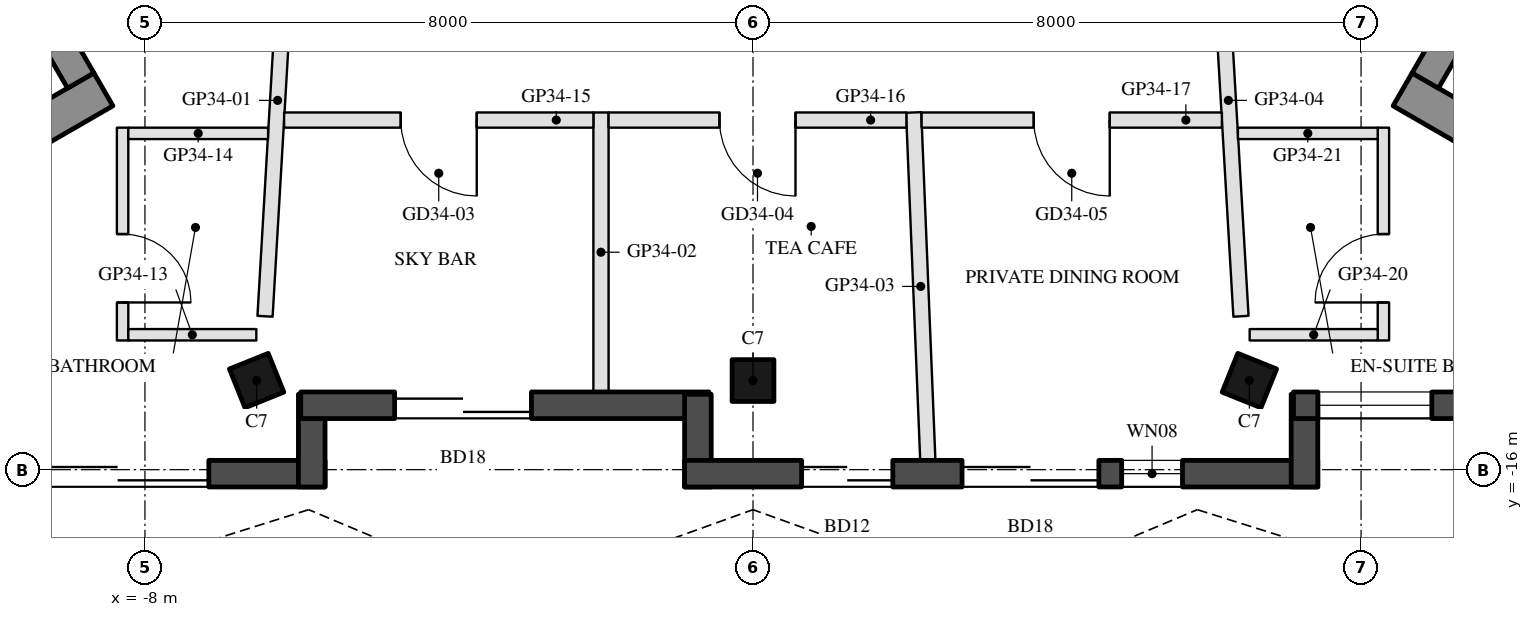
"""IFC4 building model, lengths in metres.
Left out: names, types, materials, properties, quantities, classifications, styles, units other than length and angle.
Written with IfcOpenShell. Run it as: python <this file> out.ifc"""

import sys

from ifc_helpers import new_model, si_unit, direction, frame, frame_2d, origin, origin_2d, place, context, subcontext, project, spatial, rectangle, hollow_rectangle, extrude, boolean, halfspace, element, fill, save


model = new_model("IFC4")
c1 = context("Model", 3, precision=1e-05, world=origin(), true_north=direction((0.0, 1.0)))
c2 = subcontext(c1, "Body", "Model", "MODEL_VIEW")
j1 = project(units=[si_unit("LENGTHUNIT", "METRE"), si_unit("PLANEANGLEUNIT", "RADIAN")], contexts=[c1])
p1 = place(None, origin())
s1 = spatial("IfcSite", under=j1, at=p1, CompositionType="ELEMENT")
p2 = place(p1, origin())
s2 = spatial("IfcBuilding", under=s1, at=p2, CompositionType="ELEMENT")
p3 = place(p2, frame((0.0, 0.0, 320.7)))
s3 = spatial("IfcBuildingStorey", under=s2, at=p3, CompositionType="ELEMENT", Elevation=320.7)
p4 = place(p3, frame((-6.531, -14.827, 0.0), z_axis=(0.060871062735, 0.151168564354, 0.986632038235), x_axis=(-0.998135304591, 0.004721094283, 0.0608574153)))
e1 = element("IfcColumn", 1, at=p4, inside=s3, PredefinedType="COLUMN", context=c2, shape_type="SweptSolid", body=[
    boolean("DIFFERENCE", boolean("DIFFERENCE", extrude(hollow_rectangle(XDim=0.55, YDim=0.55, WallThickness=0.025, at=origin_2d()), origin(), (0.0, 0.0, 1.0), 3.75), halfspace(frame((0.0, 0.0, 0.034), z_axis=(0.0, 0.0, 1.0), x_axis=(1.0, 0.0, 0.0)), True)), halfspace(frame((0.0, 0.0, 3.716), z_axis=(0.0, 0.0, 1.0), x_axis=(1.0, 0.0, 0.0)), False)),
])
p5 = place(p3, frame((0.0, -14.827, 0.0), z_axis=(0.0, 0.151449406449, 0.988465010653), x_axis=(-1.0, 0.0, 0.0)))
e2 = element("IfcColumn", 2, at=p5, inside=s3, PredefinedType="COLUMN", context=c2, shape_type="SweptSolid", body=[
    boolean("DIFFERENCE", boolean("DIFFERENCE", extrude(hollow_rectangle(XDim=0.55, YDim=0.55, WallThickness=0.025, at=origin_2d()), origin(), (0.0, 0.0, 1.0), 3.743), halfspace(frame((0.0, 0.0, 0.031), z_axis=(0.0, 0.0, 1.0), x_axis=(1.0, 0.0, 0.0)), True)), halfspace(frame((0.0, 0.0, 3.711), z_axis=(0.0, 0.0, 1.0), x_axis=(1.0, 0.0, 0.0)), False)),
])
p6 = place(p3, frame((6.531, -14.827, 0.0), z_axis=(-0.060871062735, 0.151168564354, 0.986632038235), x_axis=(0.998135304591, 0.004721094283, 0.0608574153)))
e3 = element("IfcColumn", 3, at=p6, inside=s3, PredefinedType="COLUMN", context=c2, shape_type="SweptSolid", body=[
    boolean("DIFFERENCE", boolean("DIFFERENCE", extrude(hollow_rectangle(XDim=0.55, YDim=0.55, WallThickness=0.025, at=origin_2d()), origin(), (0.0, 0.0, 1.0), 3.75), halfspace(frame((0.0, 0.0, 0.034), z_axis=(0.0, 0.0, 1.0), x_axis=(1.0, 0.0, 0.0)), True)), halfspace(frame((0.0, 0.0, 3.716), z_axis=(0.0, 0.0, 1.0), x_axis=(1.0, 0.0, 0.0)), False)),
])
p7 = place(p3, frame((-15.554, -16.052, 0.0), z_axis=(0.0, 0.0, 1.0), x_axis=(1.0, 0.0, 0.0)))
e4 = element("IfcWall", 4, at=p7, inside=s3, PredefinedType="SOLIDWALL", context=c2, shape_type="SweptSolid", body=[
    extrude(rectangle(XDim=9.924, YDim=0.35, at=frame_2d((4.962, 0.0))), origin(), (0.0, 0.0, 1.0), 3.55),
])
p8 = place(p7, frame((0.381, 0.0, 0.3)))
e5 = element("IfcOpeningElement", 5, at=p8, cuts=e4, PredefinedType="OPENING", context=c2, shape_type="SweptSolid", body=[
    extrude(rectangle(XDim=1.4, YDim=2.65, at=frame_2d((0.7, 1.325))), frame((0.0, 0.185, 0.0), z_axis=(0.0, -1.0, 0.0), x_axis=(1.0, 0.0, 0.0)), (0.0, 0.0, 1.0), 0.37),
])
p9 = place(p7, frame((5.995, 0.0, 0.0)))
e6 = element("IfcOpeningElement", 6, at=p9, cuts=e4, PredefinedType="OPENING", context=c2, shape_type="SweptSolid", body=[
    extrude(rectangle(XDim=2.4, YDim=2.4, at=frame_2d((1.2, 1.2))), frame((0.0, 0.185, 0.0), z_axis=(0.0, -1.0, 0.0), x_axis=(1.0, 0.0, 0.0)), (0.0, 0.0, 1.0), 0.37),
])
p10 = place(p7, frame((3.58, 0.0, 0.3)))
e7 = element("IfcOpeningElement", 7, at=p10, cuts=e4, PredefinedType="OPENING", context=c2, shape_type="SweptSolid", body=[
    extrude(rectangle(XDim=2.1, YDim=2.65, at=frame_2d((1.05, 1.325))), frame((0.0, 0.185, 0.0), z_axis=(0.0, -1.0, 0.0), x_axis=(1.0, 0.0, 0.0)), (0.0, 0.0, 1.0), 0.37),
])
p11 = place(p3, frame((-5.806, -16.228, 0.0), z_axis=(0.0, 0.0, 1.0), x_axis=(0.0, 1.0, 0.0)))
e8 = element("IfcWall", 8, at=p11, inside=s3, PredefinedType="SOLIDWALL", context=c2, shape_type="SweptSolid", body=[
    extrude(rectangle(XDim=1.22, YDim=0.35, at=frame_2d((0.61, 0.0))), origin(), (0.0, 0.0, 1.0), 3.55),
])
p12 = place(p3, frame((-5.951, -15.153, 0.0), z_axis=(0.0, 0.0, 1.0), x_axis=(1.0, 0.0, 0.0)))
e9 = element("IfcWall", 9, at=p12, inside=s3, PredefinedType="SOLIDWALL", context=c2, shape_type="SweptSolid", body=[
    extrude(rectangle(XDim=5.371, YDim=0.35, at=frame_2d((2.685, 0.0))), origin(), (0.0, 0.0, 1.0), 3.55),
])
p13 = place(p12, frame((1.236, 0.0, 0.0)))
e10 = element("IfcOpeningElement", 10, at=p13, cuts=e9, PredefinedType="OPENING", context=c2, shape_type="SweptSolid", body=[
    extrude(rectangle(XDim=1.8, YDim=2.4, at=frame_2d((0.9, 1.2))), frame((0.0, 0.185, 0.0), z_axis=(0.0, -1.0, 0.0), x_axis=(1.0, 0.0, 0.0)), (0.0, 0.0, 1.0), 0.37),
])
p14 = place(p3, frame((-0.725, -15.008, 0.0), z_axis=(0.0, 0.0, 1.0), x_axis=(0.0, -1.0, 0.0)))
e11 = element("IfcWall", 11, at=p14, inside=s3, PredefinedType="SOLIDWALL", context=c2, shape_type="SweptSolid", body=[
    extrude(rectangle(XDim=1.22, YDim=0.35, at=frame_2d((0.61, 0.0))), origin(), (0.0, 0.0, 1.0), 3.55),
])
p15 = place(p3, frame((-0.9, -16.052, 0.0), z_axis=(0.0, 0.0, 1.0), x_axis=(1.0, 0.0, 0.0)))
e12 = element("IfcWall", 12, at=p15, inside=s3, PredefinedType="SOLIDWALL", context=c2, shape_type="SweptSolid", body=[
    extrude(rectangle(XDim=8.331, YDim=0.35, at=frame_2d((4.165, 0.0))), origin(), (0.0, 0.0, 1.0), 3.55),
])
p16 = place(p15, frame((1.539, 0.0, 0.0)))
e13 = element("IfcOpeningElement", 13, at=p16, cuts=e12, PredefinedType="OPENING", context=c2, shape_type="SweptSolid", body=[
    extrude(rectangle(XDim=1.2, YDim=2.4, at=frame_2d((0.6, 1.2))), frame((0.0, 0.185, 0.0), z_axis=(0.0, -1.0, 0.0), x_axis=(1.0, 0.0, 0.0)), (0.0, 0.0, 1.0), 0.37),
])
p17 = place(p15, frame((3.65, 0.0, 0.0)))
e14 = element("IfcOpeningElement", 14, at=p17, cuts=e12, PredefinedType="OPENING", context=c2, shape_type="SweptSolid", body=[
    extrude(rectangle(XDim=1.8, YDim=2.4, at=frame_2d((0.9, 1.2))), frame((0.0, 0.185, 0.0), z_axis=(0.0, -1.0, 0.0), x_axis=(1.0, 0.0, 0.0)), (0.0, 0.0, 1.0), 0.37),
])
p18 = place(p15, frame((5.75, 0.0, 0.3)))
e15 = element("IfcOpeningElement", 15, at=p18, cuts=e12, PredefinedType="OPENING", context=c2, shape_type="SweptSolid", body=[
    extrude(rectangle(XDim=0.8, YDim=2.65, at=frame_2d((0.4, 1.325))), frame((0.0, 0.185, 0.0), z_axis=(0.0, -1.0, 0.0), x_axis=(1.0, 0.0, 0.0)), (0.0, 0.0, 1.0), 0.37),
])
p19 = place(p3, frame((7.256, -16.228, 0.0), z_axis=(0.0, 0.0, 1.0), x_axis=(0.0, 1.0, 0.0)))
e16 = element("IfcWall", 16, at=p19, inside=s3, PredefinedType="SOLIDWALL", context=c2, shape_type="SweptSolid", body=[
    extrude(rectangle(XDim=1.22, YDim=0.35, at=frame_2d((0.61, 0.0))), origin(), (0.0, 0.0, 1.0), 3.55),
])
p20 = place(p3, frame((7.111, -15.153, 0.0), z_axis=(0.0, 0.0, 1.0), x_axis=(1.0, 0.0, 0.0)))
e17 = element("IfcWall", 17, at=p20, inside=s3, PredefinedType="SOLIDWALL", context=c2, shape_type="SweptSolid", body=[
    extrude(rectangle(XDim=5.371, YDim=0.35, at=frame_2d((2.686, 0.0))), origin(), (0.0, 0.0, 1.0), 3.55),
])
p21 = place(p20, frame((2.201, 0.0, 0.0)))
e18 = element("IfcOpeningElement", 18, at=p21, cuts=e17, PredefinedType="OPENING", context=c2, shape_type="SweptSolid", body=[
    extrude(rectangle(XDim=2.4, YDim=2.4, at=frame_2d((1.2, 1.2))), frame((0.0, 0.185, 0.0), z_axis=(0.0, -1.0, 0.0), x_axis=(1.0, 0.0, 0.0)), (0.0, 0.0, 1.0), 0.37),
])
p22 = place(p20, frame((0.32, 0.0, 0.3)))
e19 = element("IfcOpeningElement", 19, at=p22, cuts=e17, PredefinedType="OPENING", context=c2, shape_type="SweptSolid", body=[
    extrude(rectangle(XDim=1.5, YDim=2.65, at=frame_2d((0.75, 1.325))), frame((0.0, 0.185, 0.0), z_axis=(0.0, -1.0, 0.0), x_axis=(1.0, 0.0, 0.0)), (0.0, 0.0, 1.0), 0.37),
])
p23 = place(p3, frame((-8.547, -10.997, 0.0), z_axis=(0.0, 0.0, 1.0), x_axis=(-0.866025286072, -0.500000203884, 0.0)))
e20 = element("IfcWall", 20, at=p23, inside=s3, PredefinedType="SHEAR", context=c2, shape_type="SweptSolid", body=[
    extrude(rectangle(XDim=9.283, YDim=0.5, at=frame_2d((4.641, 0.0))), origin(), (0.0, 0.0, 1.0), 3.5),
])
p24 = place(p3, frame((-13.845, -2.22, 0.0), z_axis=(0.0, 0.0, 1.0), x_axis=(0.500004234368, -0.866022959057, 0.0)))
e21 = element("IfcWall", 21, at=p24, inside=s3, PredefinedType="SHEAR", context=c2, shape_type="SweptSolid", body=[
    extrude(rectangle(XDim=10.0, YDim=0.4, at=frame_2d((5.0, 0.0))), origin(), (0.0, 0.0, 1.0), 3.5),
])
p25 = place(p24, frame((3.55, 0.0, 0.0)))
e22 = element("IfcOpeningElement", 22, at=p25, cuts=e21, PredefinedType="OPENING", context=c2, shape_type="SweptSolid", body=[
    extrude(rectangle(XDim=1.1, YDim=2.1, at=frame_2d((0.55, 1.05))), frame((0.0, 0.21, 0.0), z_axis=(0.0, -1.0, 0.0), x_axis=(1.0, 0.0, 0.0)), (0.0, 0.0, 1.0), 0.42),
])
p26 = place(p24, frame((5.85, 0.0, 0.0)))
e23 = element("IfcOpeningElement", 23, at=p26, cuts=e21, PredefinedType="OPENING", context=c2, shape_type="SweptSolid", body=[
    extrude(rectangle(XDim=1.4, YDim=2.1, at=frame_2d((0.7, 1.05))), frame((0.0, 0.21, 0.0), z_axis=(0.0, -1.0, 0.0), x_axis=(1.0, 0.0, 0.0)), (0.0, 0.0, 1.0), 0.42),
])
p27 = place(p3, frame((8.547, -10.997, 0.0), z_axis=(0.0, 0.0, 1.0), x_axis=(0.866025286072, -0.500000203884, 0.0)))
e24 = element("IfcWall", 24, at=p27, inside=s3, PredefinedType="SHEAR", context=c2, shape_type="SweptSolid", body=[
    extrude(rectangle(XDim=9.283, YDim=0.5, at=frame_2d((4.641, 0.0))), origin(), (0.0, 0.0, 1.0), 3.5),
])
p28 = place(p3, frame((8.845, -10.88, 0.0), z_axis=(0.0, 0.0, 1.0), x_axis=(0.500004234368, 0.866022959057, 0.0)))
e25 = element("IfcWall", 25, at=p28, inside=s3, PredefinedType="SHEAR", context=c2, shape_type="SweptSolid", body=[
    extrude(rectangle(XDim=10.0, YDim=0.4, at=frame_2d((5.0, 0.0))), origin(), (0.0, 0.0, 1.0), 3.5),
])
p29 = place(p28, frame((3.55, 0.0, 0.0)))
e26 = element("IfcOpeningElement", 26, at=p29, cuts=e25, PredefinedType="OPENING", context=c2, shape_type="SweptSolid", body=[
    extrude(rectangle(XDim=1.1, YDim=2.1, at=frame_2d((0.55, 1.05))), frame((0.0, 0.21, 0.0), z_axis=(0.0, -1.0, 0.0), x_axis=(1.0, 0.0, 0.0)), (0.0, 0.0, 1.0), 0.42),
])
p30 = place(p28, frame((5.85, 0.0, 0.0)))
e27 = element("IfcOpeningElement", 27, at=p30, cuts=e25, PredefinedType="OPENING", context=c2, shape_type="SweptSolid", body=[
    extrude(rectangle(XDim=1.4, YDim=2.1, at=frame_2d((0.7, 1.05))), frame((0.0, 0.21, 0.0), z_axis=(0.0, -1.0, 0.0), x_axis=(1.0, 0.0, 0.0)), (0.0, 0.0, 1.0), 0.42),
])
p31 = place(p3, frame((-6.42, -13.982, 0.0), z_axis=(0.0, 0.0, 1.0), x_axis=(0.058254288977, 0.998301776927, 0.0)))
e28 = element("IfcWall", 28, at=p31, inside=s3, PredefinedType="PARTITIONING", context=c2, shape_type="SweptSolid", body=[
    extrude(rectangle(XDim=5.691, YDim=0.2, at=frame_2d((2.846, 0.0))), origin(), (0.0, 0.0, 1.0), 3.15),
])
p32 = place(p3, frame((-2.0, -14.978, 0.0), z_axis=(0.0, 0.0, 1.0), x_axis=(0.0, 1.0, 0.0)))
e29 = element("IfcWall", 29, at=p32, inside=s3, PredefinedType="PARTITIONING", context=c2, shape_type="SweptSolid", body=[
    extrude(rectangle(XDim=3.677, YDim=0.2, at=frame_2d((1.839, 0.0))), origin(), (0.0, 0.0, 1.0), 3.1),
])
p33 = place(p3, frame((2.3, -15.877, 0.0), z_axis=(0.0, 0.0, 1.0), x_axis=(-0.040608643031, 0.999175128849, 0.0)))
e30 = element("IfcWall", 30, at=p33, inside=s3, PredefinedType="PARTITIONING", context=c2, shape_type="SweptSolid", body=[
    extrude(rectangle(XDim=4.581, YDim=0.2, at=frame_2d((2.291, 0.0))), origin(), (0.0, 0.0, 1.0), 3.1),
])
p34 = place(p3, frame((6.42, -13.982, 0.0), z_axis=(0.0, 0.0, 1.0), x_axis=(-0.058254288977, 0.998301776927, 0.0)))
e31 = element("IfcWall", 31, at=p34, inside=s3, PredefinedType="PARTITIONING", context=c2, shape_type="SweptSolid", body=[
    extrude(rectangle(XDim=5.691, YDim=0.2, at=frame_2d((2.846, 0.0))), origin(), (0.0, 0.0, 1.0), 3.15),
])
p35 = place(p3, frame((-8.294, -11.5, 0.0), z_axis=(0.0, 0.0, 1.0), x_axis=(0.0, -1.0, 0.0)))
e32 = element("IfcWall", 32, at=p35, inside=s3, PredefinedType="PARTITIONING", context=c2, shape_type="SweptSolid", body=[
    extrude(rectangle(XDim=2.8, YDim=0.15, at=frame_2d((1.4, 0.0))), origin(), (0.0, 0.0, 1.0), 3.1),
])
p36 = place(p35, frame((1.4, 0.0, 0.0)))
e33 = element("IfcOpeningElement", 33, at=p36, cuts=e32, PredefinedType="OPENING", context=c2, shape_type="SweptSolid", body=[
    extrude(rectangle(XDim=0.9, YDim=2.1, at=frame_2d((0.45, 1.05))), frame((0.0, 0.085, 0.0), z_axis=(0.0, -1.0, 0.0), x_axis=(1.0, 0.0, 0.0)), (0.0, 0.0, 1.0), 0.17),
])
p37 = place(p3, frame((-8.219, -14.225, 0.0), z_axis=(0.0, 0.0, 1.0), x_axis=(1.0, 0.0, 0.0)))
e34 = element("IfcWall", 34, at=p37, inside=s3, PredefinedType="PARTITIONING", context=c2, shape_type="SweptSolid", body=[
    extrude(rectangle(XDim=1.685, YDim=0.15, at=frame_2d((0.842, 0.0))), origin(), (0.0, 0.0, 1.0), 3.1),
])
p38 = place(p3, frame((-8.219, -11.575, 0.0), z_axis=(0.0, 0.0, 1.0), x_axis=(1.0, 0.0, 0.0)))
e35 = element("IfcWall", 35, at=p38, inside=s3, PredefinedType="PARTITIONING", context=c2, shape_type="SweptSolid", body=[
    extrude(rectangle(XDim=1.839, YDim=0.15, at=frame_2d((0.92, 0.0))), origin(), (0.0, 0.0, 1.0), 3.15),
])
p39 = place(p3, frame((-2.1, -11.4, 0.0), z_axis=(0.0, 0.0, 1.0), x_axis=(-1.0, 0.0, 0.0)))
e36 = element("IfcWall", 36, at=p39, inside=s3, PredefinedType="PARTITIONING", context=c2, shape_type="SweptSolid", body=[
    extrude(rectangle(XDim=4.069, YDim=0.2, at=frame_2d((2.035, 0.0))), origin(), (0.0, 0.0, 1.0), 3.15),
])
p40 = place(p39, frame((1.535, 0.0, 0.0)))
e37 = element("IfcOpeningElement", 37, at=p40, cuts=e36, PredefinedType="OPENING", context=c2, shape_type="SweptSolid", body=[
    extrude(rectangle(XDim=1.0, YDim=2.1, at=frame_2d((0.5, 1.05))), frame((0.0, 0.11, 0.0), z_axis=(0.0, -1.0, 0.0), x_axis=(1.0, 0.0, 0.0)), (0.0, 0.0, 1.0), 0.22),
])
p41 = place(p3, frame((2.018, -11.4, 0.0), z_axis=(0.0, 0.0, 1.0), x_axis=(-1.0, 0.0, 0.0)))
e38 = element("IfcWall", 38, at=p41, inside=s3, PredefinedType="PARTITIONING", context=c2, shape_type="SweptSolid", body=[
    extrude(rectangle(XDim=3.918, YDim=0.2, at=frame_2d((1.959, 0.0))), origin(), (0.0, 0.0, 1.0), 3.15),
])
p42 = place(p41, frame((1.459, 0.0, 0.0)))
e39 = element("IfcOpeningElement", 39, at=p42, cuts=e38, PredefinedType="OPENING", context=c2, shape_type="SweptSolid", body=[
    extrude(rectangle(XDim=1.0, YDim=2.1, at=frame_2d((0.5, 1.05))), frame((0.0, 0.11, 0.0), z_axis=(0.0, -1.0, 0.0), x_axis=(1.0, 0.0, 0.0)), (0.0, 0.0, 1.0), 0.22),
])
p43 = place(p3, frame((6.169, -11.4, 0.0), z_axis=(0.0, 0.0, 1.0), x_axis=(-1.0, 0.0, 0.0)))
e40 = element("IfcWall", 40, at=p43, inside=s3, PredefinedType="PARTITIONING", context=c2, shape_type="SweptSolid", body=[
    extrude(rectangle(XDim=3.951, YDim=0.2, at=frame_2d((1.976, 0.0))), origin(), (0.0, 0.0, 1.0), 3.15),
])
p44 = place(p43, frame((1.476, 0.0, 0.0)))
e41 = element("IfcOpeningElement", 41, at=p44, cuts=e40, PredefinedType="OPENING", context=c2, shape_type="SweptSolid", body=[
    extrude(rectangle(XDim=1.0, YDim=2.1, at=frame_2d((0.5, 1.05))), frame((0.0, 0.11, 0.0), z_axis=(0.0, -1.0, 0.0), x_axis=(1.0, 0.0, 0.0)), (0.0, 0.0, 1.0), 0.22),
])
p45 = place(p3, frame((8.294, -14.3, 0.0), z_axis=(0.0, 0.0, 1.0), x_axis=(0.0, 1.0, 0.0)))
e42 = element("IfcWall", 42, at=p45, inside=s3, PredefinedType="PARTITIONING", context=c2, shape_type="SweptSolid", body=[
    extrude(rectangle(XDim=2.8, YDim=0.15, at=frame_2d((1.4, 0.0))), origin(), (0.0, 0.0, 1.0), 3.1),
])
p46 = place(p45, frame((0.5, 0.0, 0.0)))
e43 = element("IfcOpeningElement", 43, at=p46, cuts=e42, PredefinedType="OPENING", context=c2, shape_type="SweptSolid", body=[
    extrude(rectangle(XDim=0.9, YDim=2.1, at=frame_2d((0.45, 1.05))), frame((0.0, 0.085, 0.0), z_axis=(0.0, -1.0, 0.0), x_axis=(1.0, 0.0, 0.0)), (0.0, 0.0, 1.0), 0.17),
])
p47 = place(p3, frame((6.534, -14.225, 0.0), z_axis=(0.0, 0.0, 1.0), x_axis=(1.0, 0.0, 0.0)))
e44 = element("IfcWall", 44, at=p47, inside=s3, PredefinedType="PARTITIONING", context=c2, shape_type="SweptSolid", body=[
    extrude(rectangle(XDim=1.685, YDim=0.15, at=frame_2d((0.842, 0.0))), origin(), (0.0, 0.0, 1.0), 3.1),
])
p48 = place(p3, frame((6.38, -11.575, 0.0), z_axis=(0.0, 0.0, 1.0), x_axis=(1.0, 0.0, 0.0)))
e45 = element("IfcWall", 45, at=p48, inside=s3, PredefinedType="PARTITIONING", context=c2, shape_type="SweptSolid", body=[
    extrude(rectangle(XDim=1.839, YDim=0.15, at=frame_2d((0.92, 0.0))), origin(), (0.0, 0.0, 1.0), 3.15),
])
p49 = place(p9, frame((2.4, 0.0, 0.0), z_axis=(0.0, 0.0, 1.0), x_axis=(-1.0, 0.0, 0.0)))
e46 = element("IfcDoor", 46, at=p49, inside=s3, OperationType="SLIDING_TO_LEFT", PredefinedType="DOOR", context=c2, shape_type="SweptSolid", body=[
    extrude(rectangle(XDim=2.4, YDim=2.4, at=frame_2d((1.2, 1.2))), frame((0.0, 0.025, 0.0), z_axis=(0.0, -1.0, 0.0), x_axis=(1.0, 0.0, 0.0)), (0.0, 0.0, 1.0), 0.05),
])
fill(e6, e46)
p50 = place(p13, frame((1.8, 0.0, 0.0), z_axis=(0.0, 0.0, 1.0), x_axis=(-1.0, 0.0, 0.0)))
e47 = element("IfcDoor", 47, at=p50, inside=s3, OperationType="SLIDING_TO_LEFT", PredefinedType="DOOR", context=c2, shape_type="SweptSolid", body=[
    extrude(rectangle(XDim=1.8, YDim=2.4, at=frame_2d((0.9, 1.2))), frame((0.0, 0.025, 0.0), z_axis=(0.0, -1.0, 0.0), x_axis=(1.0, 0.0, 0.0)), (0.0, 0.0, 1.0), 0.05),
])
fill(e10, e47)
p51 = place(p16, frame((1.2, 0.0, 0.0), z_axis=(0.0, 0.0, 1.0), x_axis=(-1.0, 0.0, 0.0)))
e48 = element("IfcDoor", 48, at=p51, inside=s3, OperationType="SLIDING_TO_LEFT", PredefinedType="DOOR", context=c2, shape_type="SweptSolid", body=[
    extrude(rectangle(XDim=1.2, YDim=2.4, at=frame_2d((0.6, 1.2))), frame((0.0, 0.025, 0.0), z_axis=(0.0, -1.0, 0.0), x_axis=(1.0, 0.0, 0.0)), (0.0, 0.0, 1.0), 0.05),
])
fill(e13, e48)
p52 = place(p17, frame((1.8, 0.0, 0.0), z_axis=(0.0, 0.0, 1.0), x_axis=(-1.0, 0.0, 0.0)))
e49 = element("IfcDoor", 49, at=p52, inside=s3, OperationType="SLIDING_TO_LEFT", PredefinedType="DOOR", context=c2, shape_type="SweptSolid", body=[
    extrude(rectangle(XDim=1.8, YDim=2.4, at=frame_2d((0.9, 1.2))), frame((0.0, 0.025, 0.0), z_axis=(0.0, -1.0, 0.0), x_axis=(1.0, 0.0, 0.0)), (0.0, 0.0, 1.0), 0.05),
])
fill(e14, e49)
p53 = place(p18, origin())
e50 = element("IfcWindow", 50, at=p53, inside=s3, PartitioningType="SINGLE_PANEL", PredefinedType="WINDOW", context=c2, shape_type="SweptSolid", body=[
    extrude(rectangle(XDim=0.8, YDim=2.65, at=frame_2d((0.4, 1.325))), frame((0.0, 0.03, 0.0), z_axis=(0.0, -1.0, 0.0), x_axis=(1.0, 0.0, 0.0)), (0.0, 0.0, 1.0), 0.06),
])
fill(e15, e50)
p54 = place(p22, origin())
e51 = element("IfcWindow", 51, at=p54, inside=s3, PartitioningType="SINGLE_PANEL", PredefinedType="WINDOW", context=c2, shape_type="SweptSolid", body=[
    extrude(rectangle(XDim=1.5, YDim=2.65, at=frame_2d((0.75, 1.325))), frame((0.0, 0.03, 0.0), z_axis=(0.0, -1.0, 0.0), x_axis=(1.0, 0.0, 0.0)), (0.0, 0.0, 1.0), 0.06),
])
fill(e19, e51)
p55 = place(p36, origin())
e52 = element("IfcDoor", 52, at=p55, inside=s3, OperationType="SINGLE_SWING_RIGHT", PredefinedType="DOOR", context=c2, shape_type="SweptSolid", body=[
    extrude(rectangle(XDim=0.9, YDim=2.1, at=frame_2d((0.45, 1.05))), frame((0.0, 0.025, 0.0), z_axis=(0.0, -1.0, 0.0), x_axis=(1.0, 0.0, 0.0)), (0.0, 0.0, 1.0), 0.05),
])
fill(e33, e52)
p56 = place(p40, origin())
e53 = element("IfcDoor", 53, at=p56, inside=s3, OperationType="SINGLE_SWING_LEFT", PredefinedType="DOOR", context=c2, shape_type="SweptSolid", body=[
    extrude(rectangle(XDim=1.0, YDim=2.1, at=frame_2d((0.5, 1.05))), frame((0.0, 0.025, 0.0), z_axis=(0.0, -1.0, 0.0), x_axis=(1.0, 0.0, 0.0)), (0.0, 0.0, 1.0), 0.05),
])
fill(e37, e53)
p57 = place(p42, origin())
e54 = element("IfcDoor", 54, at=p57, inside=s3, OperationType="SINGLE_SWING_LEFT", PredefinedType="DOOR", context=c2, shape_type="SweptSolid", body=[
    extrude(rectangle(XDim=1.0, YDim=2.1, at=frame_2d((0.5, 1.05))), frame((0.0, 0.025, 0.0), z_axis=(0.0, -1.0, 0.0), x_axis=(1.0, 0.0, 0.0)), (0.0, 0.0, 1.0), 0.05),
])
fill(e39, e54)
p58 = place(p44, origin())
e55 = element("IfcDoor", 55, at=p58, inside=s3, OperationType="SINGLE_SWING_LEFT", PredefinedType="DOOR", context=c2, shape_type="SweptSolid", body=[
    extrude(rectangle(XDim=1.0, YDim=2.1, at=frame_2d((0.5, 1.05))), frame((0.0, 0.025, 0.0), z_axis=(0.0, -1.0, 0.0), x_axis=(1.0, 0.0, 0.0)), (0.0, 0.0, 1.0), 0.05),
])
fill(e41, e55)
p59 = place(p46, origin())
e56 = element("IfcDoor", 56, at=p59, inside=s3, OperationType="SINGLE_SWING_LEFT", PredefinedType="DOOR", context=c2, shape_type="SweptSolid", body=[
    extrude(rectangle(XDim=0.9, YDim=2.1, at=frame_2d((0.45, 1.05))), frame((0.0, 0.025, 0.0), z_axis=(0.0, -1.0, 0.0), x_axis=(1.0, 0.0, 0.0)), (0.0, 0.0, 1.0), 0.05),
])
fill(e43, e56)
save(model, sys.argv[1])
